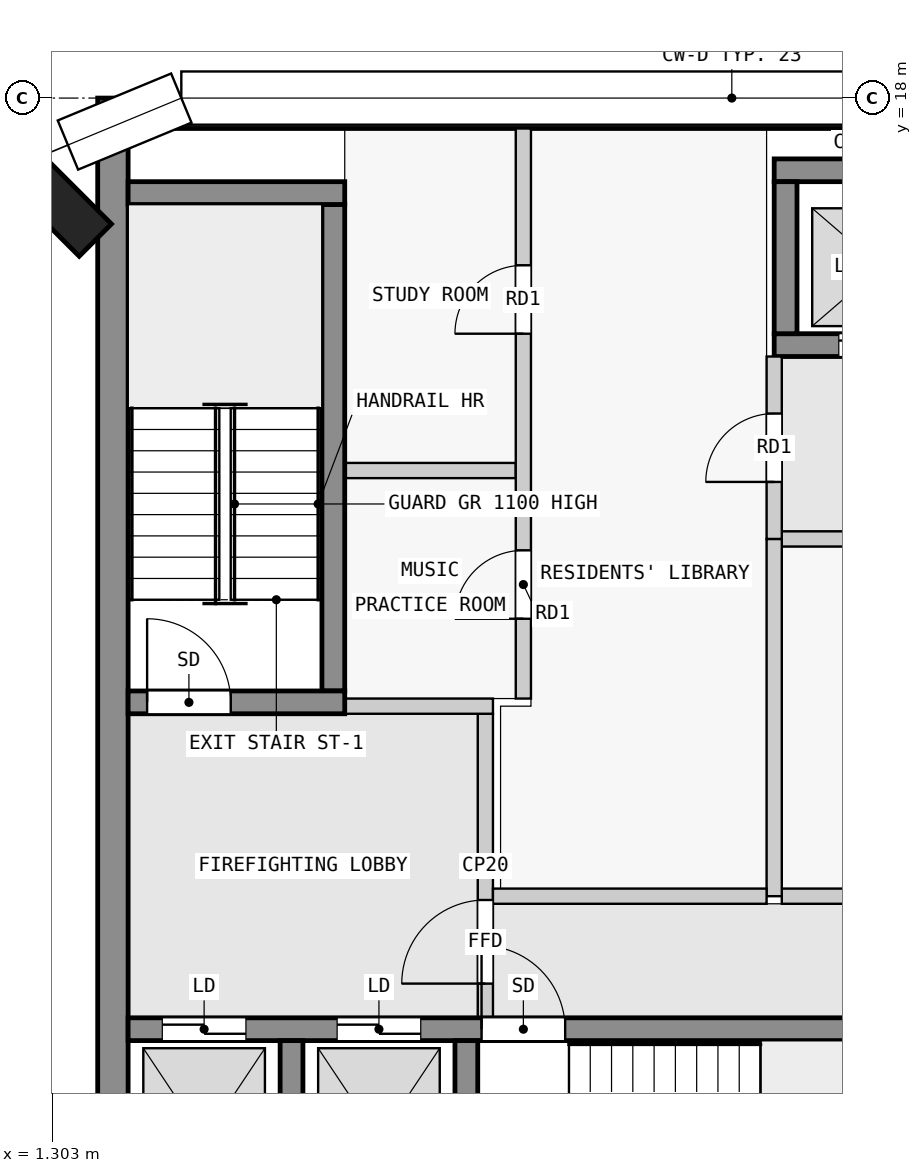
"""IFC4 building model, lengths in metres.
Left out: names, types, materials, properties, quantities, classifications, styles, units other than length and angle.
Written with IfcOpenShell. Run it as: python <this file> out.ifc"""

import sys

from ifc_helpers import new_model, si_unit, direction, frame, frame_2d, origin, origin_2d, place, context, subcontext, project, spatial, rectangle, extrude, element, fill, save


model = new_model("IFC4")
c1 = context("Model", 3, precision=1e-05, world=origin(), true_north=direction((0.0, 1.0)))
c2 = subcontext(c1, "Body", "Model", "MODEL_VIEW")
j1 = project(units=[si_unit("LENGTHUNIT", "METRE"), si_unit("PLANEANGLEUNIT", "RADIAN")], contexts=[c1])
p1 = place(None, origin())
s1 = spatial("IfcSite", under=j1, at=p1, CompositionType="ELEMENT")
p2 = place(p1, origin())
s2 = spatial("IfcBuilding", under=s1, at=p2, CompositionType="ELEMENT")
p3 = place(p2, frame((0.0, 0.0, 294.9)))
s3 = spatial("IfcBuildingStorey", under=s2, at=p3, CompositionType="ELEMENT", Elevation=294.9)
p4 = place(p3, frame((1.374, 16.626, 0.0), z_axis=(0.0, 0.0, 1.0), x_axis=(0.707106781187, 0.707106781187, 0.0)))
e1 = element("IfcColumn", 1, at=p4, inside=s3, PredefinedType="COLUMN", context=c2, shape_type="SweptSolid", body=[
    extrude(rectangle(XDim=0.6, YDim=1.4, at=origin_2d()), origin(), (0.0, 0.0, 1.0), 3.5),
])
p5 = place(p3, frame((1.9, 17.8, 0.0), z_axis=(0.0, 0.0, 1.0), x_axis=(1.0, 0.0, 0.0)))
e2 = element("IfcWall", 2, at=p5, inside=s3, PredefinedType="SHEAR", context=c2, shape_type="SweptSolid", body=[
    extrude(rectangle(XDim=20.6, YDim=0.4, at=frame_2d((10.3, 0.0))), origin(), (0.0, 0.0, 1.0), 3.25),
])
p6 = place(p3, frame((2.1, 2.5, 0.0), z_axis=(0.0, 0.0, 1.0), x_axis=(0.0, 1.0, 0.0)))
e3 = element("IfcWall", 3, at=p6, inside=s3, PredefinedType="SHEAR", context=c2, shape_type="SweptSolid", body=[
    extrude(rectangle(XDim=15.1, YDim=0.4, at=frame_2d((7.55, 0.0))), origin(), (0.0, 0.0, 1.0), 3.25),
])
for number, where, z_axis, x_axis in (
    (4, (4.45, 2.8, 0.0), (0.0, 0.0, 1.0), (0.0, 1.0, 0.0)),
    (5, (6.75, 2.8, 0.0), (0.0, 0.0, 1.0), (0.0, 1.0, 0.0)),
):
    element("IfcWall", number, at=place(p3, frame(where, z_axis=z_axis, x_axis=x_axis)), inside=s3, PredefinedType="SHEAR", context=c2, shape_type="SweptSolid", body=[
        extrude(rectangle(XDim=2.8, YDim=0.3, at=frame_2d((1.4, 0.0))), origin(), (0.0, 0.0, 1.0), 3.25),
    ])
p7 = place(p3, frame((2.3, 5.75, 0.0), z_axis=(0.0, 0.0, 1.0), x_axis=(1.0, 0.0, 0.0)))
e6 = element("IfcWall", 6, at=p7, inside=s3, PredefinedType="SHEAR", context=c2, shape_type="SweptSolid", body=[
    extrude(rectangle(XDim=18.8, YDim=0.3, at=frame_2d((9.4, 0.0))), origin(), (0.0, 0.0, 1.0), 3.25),
])
p8 = place(p7, frame((4.65, 0.0, 0.0)))
e7 = element("IfcOpeningElement", 7, at=p8, cuts=e6, PredefinedType="OPENING", context=c2, shape_type="SweptSolid", body=[
    extrude(rectangle(XDim=1.1, YDim=2.1, at=frame_2d((0.55, 1.05))), frame((0.0, 0.16, 0.0), z_axis=(0.0, -1.0, 0.0), x_axis=(1.0, 0.0, 0.0)), (0.0, 0.0, 1.0), 0.32),
])
p9 = place(p7, frame((0.45, 0.0, 0.0)))
e8 = element("IfcOpeningElement", 8, at=p9, cuts=e6, PredefinedType="OPENING", context=c2, shape_type="SweptSolid", body=[
    extrude(rectangle(XDim=1.1, YDim=2.1, at=frame_2d((0.55, 1.05))), frame((0.0, 0.16, 0.0), z_axis=(0.0, -1.0, 0.0), x_axis=(1.0, 0.0, 0.0)), (0.0, 0.0, 1.0), 0.32),
])
p10 = place(p7, frame((2.75, 0.0, 0.0)))
e9 = element("IfcOpeningElement", 9, at=p10, cuts=e6, PredefinedType="OPENING", context=c2, shape_type="SweptSolid", body=[
    extrude(rectangle(XDim=1.1, YDim=2.1, at=frame_2d((0.55, 1.05))), frame((0.0, 0.16, 0.0), z_axis=(0.0, -1.0, 0.0), x_axis=(1.0, 0.0, 0.0)), (0.0, 0.0, 1.0), 0.32),
])
p11 = place(p7, frame((11.95, 0.0, 0.0)))
e10 = element("IfcOpeningElement", 10, at=p11, cuts=e6, PredefinedType="OPENING", context=c2, shape_type="SweptSolid", body=[
    extrude(rectangle(XDim=0.9, YDim=2.1, at=frame_2d((0.45, 1.05))), frame((0.0, 0.16, 0.0), z_axis=(0.0, -1.0, 0.0), x_axis=(1.0, 0.0, 0.0)), (0.0, 0.0, 1.0), 0.32),
])
p12 = place(p7, frame((15.7, 0.0, 0.0)))
e11 = element("IfcOpeningElement", 11, at=p12, cuts=e6, PredefinedType="OPENING", context=c2, shape_type="SweptSolid", body=[
    extrude(rectangle(XDim=0.9, YDim=2.1, at=frame_2d((0.45, 1.05))), frame((0.0, 0.16, 0.0), z_axis=(0.0, -1.0, 0.0), x_axis=(1.0, 0.0, 0.0)), (0.0, 0.0, 1.0), 0.32),
])
p13 = place(p3, frame((2.3, 10.05, 0.0), z_axis=(0.0, 0.0, 1.0), x_axis=(1.0, 0.0, 0.0)))
e12 = element("IfcWall", 12, at=p13, inside=s3, PredefinedType="SHEAR", context=c2, shape_type="SweptSolid", body=[
    extrude(rectangle(XDim=2.85, YDim=0.3, at=frame_2d((1.425, 0.0))), origin(), (0.0, 0.0, 1.0), 3.25),
])
p14 = place(p13, frame((0.25, 0.0, 0.0)))
e13 = element("IfcOpeningElement", 13, at=p14, cuts=e12, PredefinedType="OPENING", context=c2, shape_type="SweptSolid", body=[
    extrude(rectangle(XDim=1.1, YDim=2.1, at=frame_2d((0.55, 1.05))), frame((0.0, 0.16, 0.0), z_axis=(0.0, -1.0, 0.0), x_axis=(1.0, 0.0, 0.0)), (0.0, 0.0, 1.0), 0.32),
])
p15 = place(p3, frame((5.0, 10.2, 0.0), z_axis=(0.0, 0.0, 1.0), x_axis=(0.0, 1.0, 0.0)))
e14 = element("IfcWall", 14, at=p15, inside=s3, PredefinedType="SHEAR", context=c2, shape_type="SweptSolid", body=[
    extrude(rectangle(XDim=6.4, YDim=0.3, at=frame_2d((3.2, 0.0))), origin(), (0.0, 0.0, 1.0), 3.25),
])
p16 = place(p3, frame((2.3, 16.75, 0.0), z_axis=(0.0, 0.0, 1.0), x_axis=(1.0, 0.0, 0.0)))
e15 = element("IfcWall", 15, at=p16, inside=s3, PredefinedType="SHEAR", context=c2, shape_type="SweptSolid", body=[
    extrude(rectangle(XDim=2.85, YDim=0.3, at=frame_2d((1.425, 0.0))), origin(), (0.0, 0.0, 1.0), 3.25),
])
p17 = place(p3, frame((10.8, 17.05, 0.0), z_axis=(0.0, 0.0, 1.0), x_axis=(1.0, 0.0, 0.0)))
e16 = element("IfcWall", 16, at=p17, inside=s3, PredefinedType="SHEAR", context=c2, shape_type="SweptSolid", body=[
    extrude(rectangle(XDim=7.8, YDim=0.3, at=frame_2d((3.9, 0.0))), origin(), (0.0, 0.0, 1.0), 3.25),
])
p18 = place(p3, frame((10.8, 14.75, 0.0), z_axis=(0.0, 0.0, 1.0), x_axis=(1.0, 0.0, 0.0)))
e17 = element("IfcWall", 17, at=p18, inside=s3, PredefinedType="SHEAR", context=c2, shape_type="SweptSolid", body=[
    extrude(rectangle(XDim=7.8, YDim=0.3, at=frame_2d((3.9, 0.0))), origin(), (0.0, 0.0, 1.0), 3.25),
])
p19 = place(p18, frame((0.85, 0.0, 0.0)))
e18 = element("IfcOpeningElement", 18, at=p19, cuts=e17, PredefinedType="OPENING", context=c2, shape_type="SweptSolid", body=[
    extrude(rectangle(XDim=1.1, YDim=2.1, at=frame_2d((0.55, 1.05))), frame((0.0, 0.16, 0.0), z_axis=(0.0, -1.0, 0.0), x_axis=(1.0, 0.0, 0.0)), (0.0, 0.0, 1.0), 0.32),
])
p20 = place(p18, frame((3.35, 0.0, 0.0)))
e19 = element("IfcOpeningElement", 19, at=p20, cuts=e17, PredefinedType="OPENING", context=c2, shape_type="SweptSolid", body=[
    extrude(rectangle(XDim=1.1, YDim=2.1, at=frame_2d((0.55, 1.05))), frame((0.0, 0.16, 0.0), z_axis=(0.0, -1.0, 0.0), x_axis=(1.0, 0.0, 0.0)), (0.0, 0.0, 1.0), 0.32),
])
p21 = place(p18, frame((5.85, 0.0, 0.0)))
e20 = element("IfcOpeningElement", 20, at=p21, cuts=e17, PredefinedType="OPENING", context=c2, shape_type="SweptSolid", body=[
    extrude(rectangle(XDim=1.1, YDim=2.1, at=frame_2d((0.55, 1.05))), frame((0.0, 0.16, 0.0), z_axis=(0.0, -1.0, 0.0), x_axis=(1.0, 0.0, 0.0)), (0.0, 0.0, 1.0), 0.32),
])
p22 = place(p3, frame((10.95, 14.9, 0.0), z_axis=(0.0, 0.0, 1.0), x_axis=(0.0, 1.0, 0.0)))
e21 = element("IfcWall", 21, at=p22, inside=s3, PredefinedType="SHEAR", context=c2, shape_type="SweptSolid", body=[
    extrude(rectangle(XDim=2.0, YDim=0.3, at=frame_2d((1.0, 0.0))), origin(), (0.0, 0.0, 1.0), 3.25),
])
p23 = place(p3, frame((7.0, 5.9, 0.0), z_axis=(0.0, 0.0, 1.0), x_axis=(0.0, 1.0, 0.0)))
e22 = element("IfcWall", 22, at=p23, inside=s3, PredefinedType="PARTITIONING", context=c2, shape_type="SweptSolid", body=[
    extrude(rectangle(XDim=4.0, YDim=0.2, at=frame_2d((2.0, 0.0))), origin(), (0.0, 0.0, 1.0), 3.25),
])
p24 = place(p23, frame((0.45, 0.0, 0.0)))
e23 = element("IfcOpeningElement", 23, at=p24, cuts=e22, PredefinedType="OPENING", context=c2, shape_type="SweptSolid", body=[
    extrude(rectangle(XDim=1.1, YDim=2.1, at=frame_2d((0.55, 1.05))), frame((0.0, 0.11, 0.0), z_axis=(0.0, -1.0, 0.0), x_axis=(1.0, 0.0, 0.0)), (0.0, 0.0, 1.0), 0.22),
])
p25 = place(p3, frame((5.15, 10.0, 0.0), z_axis=(0.0, 0.0, 1.0), x_axis=(1.0, 0.0, 0.0)))
e24 = element("IfcWall", 24, at=p25, inside=s3, PredefinedType="PARTITIONING", context=c2, shape_type="SweptSolid", body=[
    extrude(rectangle(XDim=1.95, YDim=0.2, at=frame_2d((0.975, 0.0))), origin(), (0.0, 0.0, 1.0), 3.25),
])
p26 = place(p3, frame((7.1, 7.5, 0.0), z_axis=(0.0, 0.0, 1.0), x_axis=(1.0, 0.0, 0.0)))
e25 = element("IfcWall", 25, at=p26, inside=s3, PredefinedType="PARTITIONING", context=c2, shape_type="SweptSolid", body=[
    extrude(rectangle(XDim=3.6, YDim=0.2, at=frame_2d((1.8, 0.0))), origin(), (0.0, 0.0, 1.0), 3.25),
])
p27 = place(p3, frame((10.8, 12.2, 0.0), z_axis=(0.0, 0.0, 1.0), x_axis=(0.0, 1.0, 0.0)))
e26 = element("IfcWall", 26, at=p27, inside=s3, PredefinedType="PARTITIONING", context=c2, shape_type="SweptSolid", body=[
    extrude(rectangle(XDim=2.4, YDim=0.2, at=frame_2d((1.2, 0.0))), origin(), (0.0, 0.0, 1.0), 3.25),
])
p28 = place(p27, frame((0.75, 0.0, 0.0)))
e27 = element("IfcOpeningElement", 27, at=p28, cuts=e26, PredefinedType="OPENING", context=c2, shape_type="SweptSolid", body=[
    extrude(rectangle(XDim=0.9, YDim=2.1, at=frame_2d((0.45, 1.05))), frame((0.0, 0.11, 0.0), z_axis=(0.0, -1.0, 0.0), x_axis=(1.0, 0.0, 0.0)), (0.0, 0.0, 1.0), 0.22),
])
p29 = place(p3, frame((10.8, 7.5, 0.0), z_axis=(0.0, 0.0, 1.0), x_axis=(0.0, 1.0, 0.0)))
e28 = element("IfcWall", 28, at=p29, inside=s3, PredefinedType="PARTITIONING", context=c2, shape_type="SweptSolid", body=[
    extrude(rectangle(XDim=4.7, YDim=0.2, at=frame_2d((2.35, 0.0))), origin(), (0.0, 0.0, 1.0), 3.25),
])
p30 = place(p3, frame((10.9, 7.5, 0.0), z_axis=(0.0, 0.0, 1.0), x_axis=(1.0, 0.0, 0.0)))
e29 = element("IfcWall", 29, at=p30, inside=s3, PredefinedType="PARTITIONING", context=c2, shape_type="SweptSolid", body=[
    extrude(rectangle(XDim=8.7, YDim=0.2, at=frame_2d((4.35, 0.0))), origin(), (0.0, 0.0, 1.0), 3.25),
])
p31 = place(p3, frame((10.9, 12.2, 0.0), z_axis=(0.0, 0.0, 1.0), x_axis=(1.0, 0.0, 0.0)))
e30 = element("IfcWall", 30, at=p31, inside=s3, PredefinedType="PARTITIONING", context=c2, shape_type="SweptSolid", body=[
    extrude(rectangle(XDim=8.7, YDim=0.2, at=frame_2d((4.35, 0.0))), origin(), (0.0, 0.0, 1.0), 3.25),
])
p32 = place(p31, frame((1.45, 0.0, 0.0)))
e31 = element("IfcOpeningElement", 31, at=p32, cuts=e30, PredefinedType="OPENING", context=c2, shape_type="SweptSolid", body=[
    extrude(rectangle(XDim=0.9, YDim=2.1, at=frame_2d((0.45, 1.05))), frame((0.0, 0.11, 0.0), z_axis=(0.0, -1.0, 0.0), x_axis=(1.0, 0.0, 0.0)), (0.0, 0.0, 1.0), 0.22),
])
p33 = place(p31, frame((5.9, 0.0, 0.0)))
e32 = element("IfcOpeningElement", 32, at=p33, cuts=e30, PredefinedType="OPENING", context=c2, shape_type="SweptSolid", body=[
    extrude(rectangle(XDim=0.9, YDim=2.1, at=frame_2d((0.45, 1.05))), frame((0.0, 0.11, 0.0), z_axis=(0.0, -1.0, 0.0), x_axis=(1.0, 0.0, 0.0)), (0.0, 0.0, 1.0), 0.22),
])
p34 = place(p3, frame((7.5, 10.1, 0.0), z_axis=(0.0, 0.0, 1.0), x_axis=(0.0, 1.0, 0.0)))
e33 = element("IfcWall", 33, at=p34, inside=s3, PredefinedType="PARTITIONING", context=c2, shape_type="SweptSolid", body=[
    extrude(rectangle(XDim=7.5, YDim=0.2, at=frame_2d((3.75, 0.0))), origin(), (0.0, 0.0, 1.0), 3.25),
])
p35 = place(p34, frame((1.05, 0.0, 0.0)))
e34 = element("IfcOpeningElement", 34, at=p35, cuts=e33, PredefinedType="OPENING", context=c2, shape_type="SweptSolid", body=[
    extrude(rectangle(XDim=0.9, YDim=2.1, at=frame_2d((0.45, 1.05))), frame((0.0, 0.11, 0.0), z_axis=(0.0, -1.0, 0.0), x_axis=(1.0, 0.0, 0.0)), (0.0, 0.0, 1.0), 0.22),
])
p36 = place(p34, frame((4.8, 0.0, 0.0)))
e35 = element("IfcOpeningElement", 35, at=p36, cuts=e33, PredefinedType="OPENING", context=c2, shape_type="SweptSolid", body=[
    extrude(rectangle(XDim=0.9, YDim=2.1, at=frame_2d((0.45, 1.05))), frame((0.0, 0.11, 0.0), z_axis=(0.0, -1.0, 0.0), x_axis=(1.0, 0.0, 0.0)), (0.0, 0.0, 1.0), 0.22),
])
p37 = place(p3, frame((5.15, 13.1, 0.0), z_axis=(0.0, 0.0, 1.0), x_axis=(1.0, 0.0, 0.0)))
e36 = element("IfcWall", 36, at=p37, inside=s3, PredefinedType="PARTITIONING", context=c2, shape_type="SweptSolid", body=[
    extrude(rectangle(XDim=2.25, YDim=0.2, at=frame_2d((1.125, 0.0))), origin(), (0.0, 0.0, 1.0), 3.25),
])
p38 = place(p24, origin())
e37 = element("IfcDoor", 37, at=p38, inside=s3, OperationType="SINGLE_SWING_LEFT", PredefinedType="DOOR", context=c2, shape_type="SweptSolid", body=[
    extrude(rectangle(XDim=1.1, YDim=2.1, at=frame_2d((0.55, 1.05))), frame((0.0, 0.025, 0.0), z_axis=(0.0, -1.0, 0.0), x_axis=(1.0, 0.0, 0.0)), (0.0, 0.0, 1.0), 0.05),
])
fill(e23, e37)
p39 = place(p14, origin())
e38 = element("IfcDoor", 38, at=p39, inside=s3, OperationType="SINGLE_SWING_RIGHT", PredefinedType="DOOR", context=c2, shape_type="SweptSolid", body=[
    extrude(rectangle(XDim=1.1, YDim=2.1, at=frame_2d((0.55, 1.05))), frame((0.0, 0.025, 0.0), z_axis=(0.0, -1.0, 0.0), x_axis=(1.0, 0.0, 0.0)), (0.0, 0.0, 1.0), 0.05),
])
fill(e13, e38)
p40 = place(p28, origin())
e39 = element("IfcDoor", 39, at=p40, inside=s3, OperationType="SINGLE_SWING_LEFT", PredefinedType="DOOR", context=c2, shape_type="SweptSolid", body=[
    extrude(rectangle(XDim=0.9, YDim=2.1, at=frame_2d((0.45, 1.05))), frame((0.0, 0.025, 0.0), z_axis=(0.0, -1.0, 0.0), x_axis=(1.0, 0.0, 0.0)), (0.0, 0.0, 1.0), 0.05),
])
fill(e27, e39)
p41 = place(p8, origin())
e40 = element("IfcDoor", 40, at=p41, inside=s3, OperationType="SINGLE_SWING_LEFT", PredefinedType="DOOR", context=c2, shape_type="SweptSolid", body=[
    extrude(rectangle(XDim=1.1, YDim=2.1, at=frame_2d((0.55, 1.05))), frame((0.0, 0.025, 0.0), z_axis=(0.0, -1.0, 0.0), x_axis=(1.0, 0.0, 0.0)), (0.0, 0.0, 1.0), 0.05),
])
fill(e7, e40)
p42 = place(p9, origin())
e41 = element("IfcDoor", 41, at=p42, inside=s3, OperationType="DOUBLE_DOOR_SLIDING", PredefinedType="DOOR", context=c2, shape_type="SweptSolid", body=[
    extrude(rectangle(XDim=1.1, YDim=2.1, at=frame_2d((0.55, 1.05))), frame((0.0, 0.025, 0.0), z_axis=(0.0, -1.0, 0.0), x_axis=(1.0, 0.0, 0.0)), (0.0, 0.0, 1.0), 0.05),
])
fill(e8, e41)
p43 = place(p10, origin())
e42 = element("IfcDoor", 42, at=p43, inside=s3, OperationType="DOUBLE_DOOR_SLIDING", PredefinedType="DOOR", context=c2, shape_type="SweptSolid", body=[
    extrude(rectangle(XDim=1.1, YDim=2.1, at=frame_2d((0.55, 1.05))), frame((0.0, 0.025, 0.0), z_axis=(0.0, -1.0, 0.0), x_axis=(1.0, 0.0, 0.0)), (0.0, 0.0, 1.0), 0.05),
])
fill(e9, e42)
p44 = place(p19, origin())
e43 = element("IfcDoor", 43, at=p44, inside=s3, OperationType="DOUBLE_DOOR_SLIDING", PredefinedType="DOOR", context=c2, shape_type="SweptSolid", body=[
    extrude(rectangle(XDim=1.1, YDim=2.1, at=frame_2d((0.55, 1.05))), frame((0.0, 0.025, 0.0), z_axis=(0.0, -1.0, 0.0), x_axis=(1.0, 0.0, 0.0)), (0.0, 0.0, 1.0), 0.05),
])
fill(e18, e43)
p45 = place(p35, origin())
e44 = element("IfcDoor", 44, at=p45, inside=s3, OperationType="SINGLE_SWING_RIGHT", PredefinedType="DOOR", context=c2, shape_type="SweptSolid", body=[
    extrude(rectangle(XDim=0.9, YDim=2.1, at=frame_2d((0.45, 1.05))), frame((0.0, 0.025, 0.0), z_axis=(0.0, -1.0, 0.0), x_axis=(1.0, 0.0, 0.0)), (0.0, 0.0, 1.0), 0.05),
])
fill(e34, e44)
p46 = place(p36, origin())
e45 = element("IfcDoor", 45, at=p46, inside=s3, OperationType="SINGLE_SWING_RIGHT", PredefinedType="DOOR", context=c2, shape_type="SweptSolid", body=[
    extrude(rectangle(XDim=0.9, YDim=2.1, at=frame_2d((0.45, 1.05))), frame((0.0, 0.025, 0.0), z_axis=(0.0, -1.0, 0.0), x_axis=(1.0, 0.0, 0.0)), (0.0, 0.0, 1.0), 0.05),
])
fill(e35, e45)
save(model, sys.argv[1])
